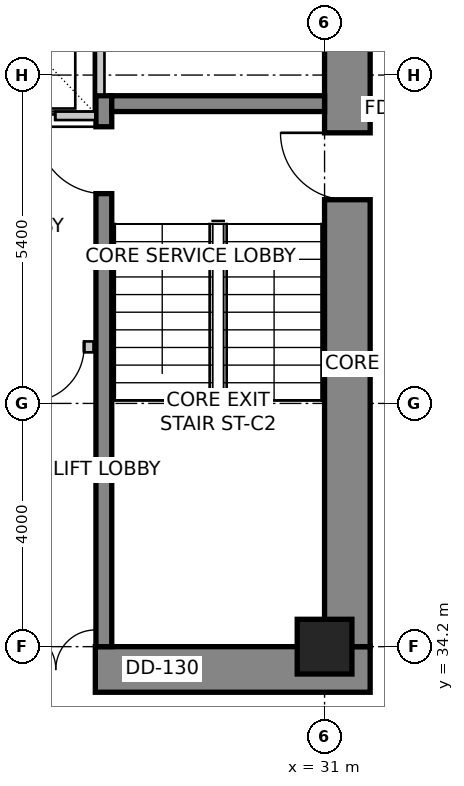
"""IFC4 building model, lengths in metres.
Left out: names, types, materials, properties, quantities, classifications, styles, units other than length and angle.
Written with IfcOpenShell. Run it as: python <this file> out.ifc"""

import sys

from ifc_helpers import new_model, si_unit, direction, frame, frame_2d, origin, origin_2d, place, context, subcontext, project, spatial, rectangle, extrude, source, transform, mapped, element, fill, save


model = new_model("IFC4")
c1 = context("Model", 3, precision=1e-05, world=origin(), true_north=direction((0.0, 1.0)))
c2 = subcontext(c1, "Body", "Model", "MODEL_VIEW")
j1 = project(units=[si_unit("LENGTHUNIT", "METRE"), si_unit("PLANEANGLEUNIT", "RADIAN")], contexts=[c1])
p1 = place(None, origin())
s1 = spatial("IfcSite", under=j1, at=p1, CompositionType="ELEMENT")
p2 = place(p1, origin())
s2 = spatial("IfcBuilding", under=s1, at=p2, CompositionType="ELEMENT")
p3 = place(p2, frame((0.0, 0.0, 153.8)))
s3 = spatial("IfcBuildingStorey", under=s2, at=p3, CompositionType="ELEMENT", Elevation=153.8)
p4 = place(p3, frame((15.85, 33.825, 0.0), z_axis=(0.0, 0.0, 1.0), x_axis=(1.0, 0.0, 0.0)))
e1 = element("IfcWall", 1, at=p4, inside=s3, PredefinedType="SHEAR", context=c2, shape_type="SweptSolid", body=[
    extrude(rectangle(XDim=15.9, YDim=0.75, at=frame_2d((7.95, 0.0))), origin(), (0.0, 0.0, 1.0), 3.6),
])
m1 = source(origin(), c2, "Body", "SweptSolid", [
    extrude(rectangle(XDim=1.3, YDim=2.15, at=frame_2d((0.65, 1.075))), frame((0.0, 0.385, 0.0), z_axis=(0.0, -1.0, 0.0), x_axis=(1.0, 0.0, 0.0)), (0.0, 0.0, 1.0), 0.77),
])
p5 = place(p4, frame((10.08, 0.0, 0.0)))
e2 = element("IfcOpeningElement", 2, at=p5, cuts=e1, PredefinedType="OPENING", context=c2, shape_type="MappedRepresentation", body=[
    mapped(m1, transform((0.0, 0.0, 0.0), scale=1.0)),
])
p6 = place(p3, frame((31.375, 34.2, 0.0), z_axis=(0.0, 0.0, 1.0), x_axis=(0.0, 1.0, 0.0)))
e3 = element("IfcWall", 3, at=p6, inside=s3, PredefinedType="SHEAR", context=c2, shape_type="SweptSolid", body=[
    extrude(rectangle(XDim=11.4, YDim=0.75, at=frame_2d((5.7, 0.0))), origin(), (0.0, 0.0, 1.0), 3.6),
])
m2 = source(origin(), c2, "Body", "SweptSolid", [
    extrude(rectangle(XDim=1.1, YDim=2.15, at=frame_2d((0.55, 1.075))), frame((0.0, 0.385, 0.0), z_axis=(0.0, -1.0, 0.0), x_axis=(1.0, 0.0, 0.0)), (0.0, 0.0, 1.0), 0.77),
])
p7 = place(p6, frame((7.35, 0.0, 0.0)))
e4 = element("IfcOpeningElement", 4, at=p7, cuts=e3, PredefinedType="OPENING", context=c2, shape_type="MappedRepresentation", body=[
    mapped(m2, transform((0.0, 0.0, 0.0), scale=1.0)),
])
p8 = place(p3, frame((27.37, 34.2, 0.0), z_axis=(0.0, 0.0, 1.0), x_axis=(0.0, 1.0, 0.0)))
e5 = element("IfcWall", 5, at=p8, inside=s3, PredefinedType="SHEAR", context=c2, shape_type="SweptSolid", body=[
    extrude(rectangle(XDim=9.06, YDim=0.26, at=frame_2d((4.53, 0.0))), origin(), (0.0, 0.0, 1.0), 3.6),
])
m3 = source(origin(), c2, "Body", "SweptSolid", [
    extrude(rectangle(XDim=1.1, YDim=2.15, at=frame_2d((0.55, 1.075))), frame((0.0, 0.14, 0.0), z_axis=(0.0, -1.0, 0.0), x_axis=(1.0, 0.0, 0.0)), (0.0, 0.0, 1.0), 0.28),
])
p9 = place(p8, frame((7.45, 0.0, 0.0)))
e6 = element("IfcOpeningElement", 6, at=p9, cuts=e5, PredefinedType="OPENING", context=c2, shape_type="MappedRepresentation", body=[
    mapped(m3, transform((0.0, 0.0, 0.0), scale=1.0)),
])
p10 = place(p3, frame((27.5, 43.13, 0.0), z_axis=(0.0, 0.0, 1.0), x_axis=(1.0, 0.0, 0.0)))
e7 = element("IfcWall", 7, at=p10, inside=s3, PredefinedType="SHEAR", context=c2, shape_type="SweptSolid", body=[
    extrude(rectangle(XDim=3.5, YDim=0.26, at=frame_2d((1.75, 0.0))), origin(), (0.0, 0.0, 1.0), 3.6),
])
m4 = source(origin(), c2, "Body", "SweptSolid", [
    extrude(rectangle(XDim=0.9, YDim=0.9, at=origin_2d()), origin(), (0.0, 0.0, 1.0), 3.6),
])
p11 = place(p3, frame((31.0, 34.2, 0.0), z_axis=(0.0, 0.0, 1.0), x_axis=(1.0, 0.0, 0.0)))
e8 = element("IfcColumn", 8, at=p11, inside=s3, PredefinedType="COLUMN", context=c2, shape_type="MappedRepresentation", body=[
    mapped(m4, transform((0.0, 0.0, 0.0), scale=1.0)),
])
p12 = place(p3, frame((20.37, 42.93, 0.0), z_axis=(0.0, 0.0, 1.0), x_axis=(1.0, 0.0, 0.0)))
e9 = element("IfcWall", 9, at=p12, inside=s3, PredefinedType="SOLIDWALL", context=c2, shape_type="SweptSolid", body=[
    extrude(rectangle(XDim=6.86, YDim=0.14, at=frame_2d((3.43, 0.0))), origin(), (0.0, 0.0, 1.0), 3.35),
])
m5 = source(origin(), c2, "Body", "SweptSolid", [
    extrude(rectangle(XDim=1.1, YDim=2.15, at=frame_2d((0.55, 1.075))), frame((0.0, 0.08, 0.0), z_axis=(0.0, -1.0, 0.0), x_axis=(1.0, 0.0, 0.0)), (0.0, 0.0, 1.0), 0.16),
])
p13 = place(p12, frame((0.5, 0.0, 0.0)))
e10 = element("IfcOpeningElement", 10, at=p13, cuts=e9, PredefinedType="OPENING", context=c2, shape_type="MappedRepresentation", body=[
    mapped(m5, transform((0.0, 0.0, 0.0), scale=1.0)),
])
p14 = place(p12, frame((2.7, 0.0, 0.0)))
e11 = element("IfcOpeningElement", 11, at=p14, cuts=e9, PredefinedType="OPENING", context=c2, shape_type="MappedRepresentation", body=[
    mapped(m5, transform((0.0, 0.0, 0.0), scale=1.0)),
])
p15 = place(p12, frame((5.1, 0.0, 0.0)))
e12 = element("IfcOpeningElement", 12, at=p15, cuts=e9, PredefinedType="OPENING", context=c2, shape_type="MappedRepresentation", body=[
    mapped(m5, transform((0.0, 0.0, 0.0), scale=1.0)),
])
p16 = place(p3, frame((27.31, 43.28, 0.0), z_axis=(0.0, 0.0, 1.0), x_axis=(0.0, 1.0, 0.0)))
e13 = element("IfcWall", 13, at=p16, inside=s3, PredefinedType="SOLIDWALL", context=c2, shape_type="SweptSolid", body=[
    extrude(rectangle(XDim=2.3, YDim=0.14, at=frame_2d((1.15, 0.0))), origin(), (0.0, 0.0, 1.0), 3.35),
])
p17 = place(p3, frame((27.2, 39.13, 0.0), z_axis=(0.0, 0.0, 1.0), x_axis=(-1.0, 0.0, 0.0)))
e14 = element("IfcWall", 14, at=p17, inside=s3, PredefinedType="PARTITIONING", context=c2, shape_type="SweptSolid", body=[
    extrude(rectangle(XDim=1.21, YDim=0.18, at=frame_2d((0.605, 0.0))), origin(), (0.0, 0.0, 1.0), 3.35),
])
m6 = source(origin(), c2, "Body", "SweptSolid", [
    extrude(rectangle(XDim=0.9, YDim=2.15, at=frame_2d((0.45, 1.075))), frame((0.0, 0.1, 0.0), z_axis=(0.0, -1.0, 0.0), x_axis=(1.0, 0.0, 0.0)), (0.0, 0.0, 1.0), 0.2),
])
p18 = place(p17, frame((0.155, 0.0, 0.0)))
e15 = element("IfcOpeningElement", 15, at=p18, cuts=e14, PredefinedType="OPENING", context=c2, shape_type="MappedRepresentation", body=[
    mapped(m6, transform((0.0, 0.0, 0.0), scale=1.0)),
])
m7 = source(origin(), c2, "Body", "SweptSolid", [
    extrude(rectangle(XDim=1.1, YDim=2.15, at=frame_2d((0.55, 1.075))), frame((0.0, 0.025, 0.0), z_axis=(0.0, -1.0, 0.0), x_axis=(1.0, 0.0, 0.0)), (0.0, 0.0, 1.0), 0.05),
])
p19 = place(p15, origin())
e16 = element("IfcDoor", 16, at=p19, inside=s3, OperationType="SLIDING_TO_LEFT", PredefinedType="DOOR", context=c2, shape_type="MappedRepresentation", body=[
    mapped(m7, transform((0.0, 0.0, 0.0), scale=1.0)),
])
fill(e12, e16)
m8 = source(origin(), c2, "Body", "SweptSolid", [
    extrude(rectangle(XDim=1.1, YDim=2.15, at=frame_2d((0.55, 1.075))), frame((0.0, 0.025, 0.0), z_axis=(0.0, -1.0, 0.0), x_axis=(1.0, 0.0, 0.0)), (0.0, 0.0, 1.0), 0.05),
])
p20 = place(p9, origin())
e17 = element("IfcDoor", 17, at=p20, inside=s3, OperationType="SINGLE_SWING_RIGHT", PredefinedType="DOOR", context=c2, shape_type="MappedRepresentation", body=[
    mapped(m8, transform((0.0, 0.0, 0.0), scale=1.0)),
])
fill(e6, e17)
p21 = place(p7, origin())
e18 = element("IfcDoor", 18, at=p21, inside=s3, OperationType="SINGLE_SWING_RIGHT", PredefinedType="DOOR", context=c2, shape_type="MappedRepresentation", body=[
    mapped(m8, transform((0.0, 0.0, 0.0), scale=1.0)),
])
fill(e4, e18)
m9 = source(origin(), c2, "Body", "SweptSolid", [
    extrude(rectangle(XDim=1.3, YDim=2.15, at=frame_2d((0.65, 1.075))), frame((0.0, 0.025, 0.0), z_axis=(0.0, -1.0, 0.0), x_axis=(1.0, 0.0, 0.0)), (0.0, 0.0, 1.0), 0.05),
])
p22 = place(p5, origin())
e19 = element("IfcDoor", 19, at=p22, inside=s3, OperationType="DOUBLE_DOOR_SINGLE_SWING", PredefinedType="DOOR", context=c2, shape_type="MappedRepresentation", body=[
    mapped(m9, transform((0.0, 0.0, 0.0), scale=1.0)),
])
fill(e2, e19)
m10 = source(origin(), c2, "Body", "SweptSolid", [
    extrude(rectangle(XDim=0.9, YDim=2.15, at=frame_2d((0.45, 1.075))), frame((0.0, 0.025, 0.0), z_axis=(0.0, -1.0, 0.0), x_axis=(1.0, 0.0, 0.0)), (0.0, 0.0, 1.0), 0.05),
])
p23 = place(p18, origin())
e20 = element("IfcDoor", 20, at=p23, inside=s3, OperationType="SINGLE_SWING_RIGHT", PredefinedType="DOOR", context=c2, shape_type="MappedRepresentation", body=[
    mapped(m10, transform((0.0, 0.0, 0.0), scale=1.0)),
])
fill(e15, e20)
save(model, sys.argv[1])
